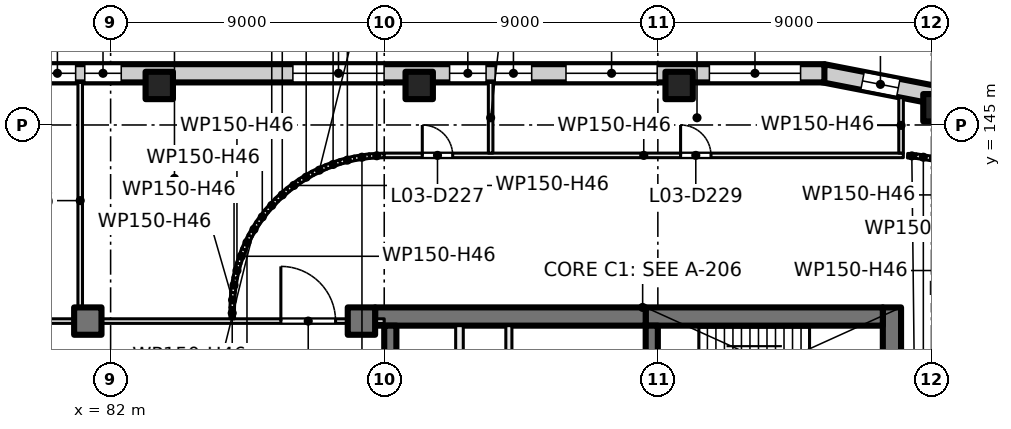
"""IFC4 building model, lengths in metres.
Left out: names, types, materials, properties, quantities, classifications, styles, units other than length and angle.
Written with IfcOpenShell. Run it as: python <this file> out.ifc"""

import sys

from ifc_helpers import new_model, si_unit, direction, frame, frame_2d, origin, origin_2d, place, context, subcontext, project, spatial, rectangle, extrude, element, fill, save


model = new_model("IFC4")
c1 = context("Model", 3, precision=1e-05, world=origin(), true_north=direction((0.0, 1.0)))
c2 = subcontext(c1, "Body", "Model", "MODEL_VIEW")
j1 = project(units=[si_unit("LENGTHUNIT", "METRE"), si_unit("PLANEANGLEUNIT", "RADIAN")], contexts=[c1])
p1 = place(None, origin())
s1 = spatial("IfcSite", under=j1, at=p1, CompositionType="ELEMENT")
p2 = place(p1, origin())
s2 = spatial("IfcBuilding", under=s1, at=p2, CompositionType="ELEMENT")
p3 = place(p2, frame((0.0, 0.0, 17.5)))
s3 = spatial("IfcBuildingStorey", under=s2, at=p3, CompositionType="ELEMENT", Elevation=17.5)
for number, where, z_axis, x_axis in (
    (1, (83.6, 146.3, 0.0), (0.0, 0.0, 1.0), (1.0, 0.0, 0.0)),
    (2, (92.15, 146.3, 0.0), (0.0, 0.0, 1.0), (1.0, 0.0, 0.0)),
    (3, (100.7, 146.3, 0.0), (0.0, 0.0, 1.0), (1.0, 0.0, 0.0)),
    (4, (109.18, 145.567, 0.0), (0.0, 0.0, 1.0), (1.0, 0.0, 0.0)),
    (5, (81.25, 138.55, 0.0), (0.0, 0.0, 1.0), (1.0, 0.0, 0.0)),
    (6, (90.25, 138.55, 0.0), (0.0, 0.0, 1.0), (1.0, 0.0, 0.0)),
):
    element("IfcColumn", number, at=place(p3, frame(where, z_axis=z_axis, x_axis=x_axis)), inside=s3, PredefinedType="COLUMN", context=c2, shape_type="SweptSolid", body=[
        extrude(rectangle(XDim=0.9, YDim=0.9, at=origin_2d()), origin(), (0.0, 0.0, 1.0), 5.0),
    ])
p4 = place(p3, frame((107.7, 139.0, 0.0), z_axis=(0.0, 0.0, 1.0), x_axis=(0.0, -1.0, 0.0)))
e7 = element("IfcWall", 7, at=p4, inside=s3, PredefinedType="SHEAR", context=c2, shape_type="SweptSolid", body=[
    extrude(rectangle(XDim=3.8, YDim=0.6, at=frame_2d((1.9, 0.0))), origin(), (0.0, 0.0, 1.0), 5.0),
])
p5 = place(p3, frame((107.4, 138.7, 0.0), z_axis=(0.0, 0.0, 1.0), x_axis=(-1.0, 0.0, 0.0)))
e8 = element("IfcWall", 8, at=p5, inside=s3, PredefinedType="SHEAR", context=c2, shape_type="SweptSolid", body=[
    extrude(rectangle(XDim=7.8, YDim=0.6, at=frame_2d((3.9, 0.0))), origin(), (0.0, 0.0, 1.0), 5.0),
])
p6 = place(p3, frame((99.6, 138.7, 0.0), z_axis=(0.0, 0.0, 1.0), x_axis=(-1.0, 0.0, 0.0)))
e9 = element("IfcWall", 9, at=p6, inside=s3, PredefinedType="SHEAR", context=c2, shape_type="SweptSolid", body=[
    extrude(rectangle(XDim=8.9, YDim=0.6, at=frame_2d((4.45, 0.0))), origin(), (0.0, 0.0, 1.0), 5.0),
])
p7 = place(p3, frame((99.8, 138.4, 0.0), z_axis=(0.0, 0.0, 1.0), x_axis=(0.0, -1.0, 0.0)))
e10 = element("IfcWall", 10, at=p7, inside=s3, PredefinedType="SHEAR", context=c2, shape_type="SweptSolid", body=[
    extrude(rectangle(XDim=2.8, YDim=0.4, at=frame_2d((1.4, 0.0))), origin(), (0.0, 0.0, 1.0), 5.0),
])
p8 = place(p7, frame((0.9, 0.0, 0.0)))
e11 = element("IfcOpeningElement", 11, at=p8, cuts=e10, PredefinedType="OPENING", context=c2, shape_type="SweptSolid", body=[
    extrude(rectangle(XDim=1.0, YDim=2.1, at=frame_2d((0.5, 1.05))), frame((0.0, 0.21, 0.0), z_axis=(0.0, -1.0, 0.0), x_axis=(1.0, 0.0, 0.0)), (0.0, 0.0, 1.0), 0.42),
])
p9 = place(p3, frame((91.2, 138.4, 0.0), z_axis=(0.0, 0.0, 1.0), x_axis=(0.0, -1.0, 0.0)))
e12 = element("IfcWall", 12, at=p9, inside=s3, PredefinedType="SHEAR", context=c2, shape_type="SweptSolid", body=[
    extrude(rectangle(XDim=8.6, YDim=0.4, at=frame_2d((4.3, 0.0))), origin(), (0.0, 0.0, 1.0), 5.0),
])
p10 = place(p3, frame((105.44, 146.702, 0.0), z_axis=(0.0, 0.0, 1.0), x_axis=(0.981593603981, -0.190981665674, 0.0)))
e13 = element("IfcWall", 13, at=p10, inside=s3, PredefinedType="SOLIDWALL", context=c2, shape_type="SweptSolid", body=[
    extrude(rectangle(XDim=4.025, YDim=0.6, at=frame_2d((2.013, 0.0))), origin(), (0.0, 0.0, 1.0), 4.6),
])
p11 = place(p10, frame((1.316, 0.0, 0.9)))
e14 = element("IfcOpeningElement", 14, at=p11, cuts=e13, PredefinedType="OPENING", context=c2, shape_type="SweptSolid", body=[
    extrude(rectangle(XDim=1.2, YDim=3.0, at=frame_2d((0.6, 1.5))), frame((0.0, 0.31, 0.0), z_axis=(0.0, -1.0, 0.0), x_axis=(1.0, 0.0, 0.0)), (0.0, 0.0, 1.0), 0.62),
])
p12 = place(p3, frame((46.114, 146.7, 0.0), z_axis=(0.0, 0.0, 1.0), x_axis=(1.0, 0.0, 0.0)))
e15 = element("IfcWall", 15, at=p12, inside=s3, PredefinedType="SOLIDWALL", context=c2, shape_type="SweptSolid", body=[
    extrude(rectangle(XDim=59.364, YDim=0.6, at=frame_2d((29.682, 0.0))), origin(), (0.0, 0.0, 1.0), 4.6),
])
p13 = place(p12, frame((5.35, 0.0, 0.9)))
e16 = element("IfcOpeningElement", 16, at=p13, cuts=e15, PredefinedType="OPENING", context=c2, shape_type="SweptSolid", body=[
    extrude(rectangle(XDim=3.0, YDim=3.0, at=frame_2d((1.5, 1.5))), frame((0.0, 0.31, 0.0), z_axis=(0.0, -1.0, 0.0), x_axis=(1.0, 0.0, 0.0)), (0.0, 0.0, 1.0), 0.62),
])
p14 = place(p12, frame((14.483, 0.0, 0.9)))
e17 = element("IfcOpeningElement", 17, at=p14, cuts=e15, PredefinedType="OPENING", context=c2, shape_type="SweptSolid", body=[
    extrude(rectangle(XDim=3.0, YDim=3.0, at=frame_2d((1.5, 1.5))), frame((0.0, 0.31, 0.0), z_axis=(0.0, -1.0, 0.0), x_axis=(1.0, 0.0, 0.0)), (0.0, 0.0, 1.0), 0.62),
])
p15 = place(p12, frame((23.615, 0.0, 0.9)))
e18 = element("IfcOpeningElement", 18, at=p15, cuts=e15, PredefinedType="OPENING", context=c2, shape_type="SweptSolid", body=[
    extrude(rectangle(XDim=3.0, YDim=3.0, at=frame_2d((1.5, 1.5))), frame((0.0, 0.31, 0.0), z_axis=(0.0, -1.0, 0.0), x_axis=(1.0, 0.0, 0.0)), (0.0, 0.0, 1.0), 0.62),
])
p16 = place(p12, frame((33.536, 0.0, 0.9)))
e19 = element("IfcOpeningElement", 19, at=p16, cuts=e15, PredefinedType="OPENING", context=c2, shape_type="SweptSolid", body=[
    extrude(rectangle(XDim=1.2, YDim=3.0, at=frame_2d((0.6, 1.5))), frame((0.0, 0.31, 0.0), z_axis=(0.0, -1.0, 0.0), x_axis=(1.0, 0.0, 0.0)), (0.0, 0.0, 1.0), 0.62),
])
p17 = place(p12, frame((35.036, 0.0, 0.9)))
e20 = element("IfcOpeningElement", 20, at=p17, cuts=e15, PredefinedType="OPENING", context=c2, shape_type="SweptSolid", body=[
    extrude(rectangle(XDim=1.2, YDim=3.0, at=frame_2d((0.6, 1.5))), frame((0.0, 0.31, 0.0), z_axis=(0.0, -1.0, 0.0), x_axis=(1.0, 0.0, 0.0)), (0.0, 0.0, 1.0), 0.62),
])
p18 = place(p12, frame((41.882, 0.0, 0.9)))
e21 = element("IfcOpeningElement", 21, at=p18, cuts=e15, PredefinedType="OPENING", context=c2, shape_type="SweptSolid", body=[
    extrude(rectangle(XDim=3.0, YDim=3.0, at=frame_2d((1.5, 1.5))), frame((0.0, 0.31, 0.0), z_axis=(0.0, -1.0, 0.0), x_axis=(1.0, 0.0, 0.0)), (0.0, 0.0, 1.0), 0.62),
])
p19 = place(p12, frame((47.036, 0.0, 0.9)))
e22 = element("IfcOpeningElement", 22, at=p19, cuts=e15, PredefinedType="OPENING", context=c2, shape_type="SweptSolid", body=[
    extrude(rectangle(XDim=1.2, YDim=3.0, at=frame_2d((0.6, 1.5))), frame((0.0, 0.31, 0.0), z_axis=(0.0, -1.0, 0.0), x_axis=(1.0, 0.0, 0.0)), (0.0, 0.0, 1.0), 0.62),
])
p20 = place(p12, frame((48.536, 0.0, 0.9)))
e23 = element("IfcOpeningElement", 23, at=p20, cuts=e15, PredefinedType="OPENING", context=c2, shape_type="SweptSolid", body=[
    extrude(rectangle(XDim=1.2, YDim=3.0, at=frame_2d((0.6, 1.5))), frame((0.0, 0.31, 0.0), z_axis=(0.0, -1.0, 0.0), x_axis=(1.0, 0.0, 0.0)), (0.0, 0.0, 1.0), 0.62),
])
p21 = place(p12, frame((50.865, 0.0, 0.9)))
e24 = element("IfcOpeningElement", 24, at=p21, cuts=e15, PredefinedType="OPENING", context=c2, shape_type="SweptSolid", body=[
    extrude(rectangle(XDim=3.0, YDim=3.0, at=frame_2d((1.5, 1.5))), frame((0.0, 0.31, 0.0), z_axis=(0.0, -1.0, 0.0), x_axis=(1.0, 0.0, 0.0)), (0.0, 0.0, 1.0), 0.62),
])
p22 = place(p12, frame((55.581, 0.0, 0.9)))
e25 = element("IfcOpeningElement", 25, at=p22, cuts=e15, PredefinedType="OPENING", context=c2, shape_type="SweptSolid", body=[
    extrude(rectangle(XDim=3.0, YDim=3.0, at=frame_2d((1.5, 1.5))), frame((0.0, 0.31, 0.0), z_axis=(0.0, -1.0, 0.0), x_axis=(1.0, 0.0, 0.0)), (0.0, 0.0, 1.0), 0.62),
])
p23 = place(p3, frame((95.1, 130.0, 0.0), z_axis=(0.0, 0.0, 1.0), x_axis=(0.0, 1.0, 0.0)))
e26 = element("IfcWall", 26, at=p23, inside=s3, PredefinedType="PARTITIONING", context=c2, shape_type="SweptSolid", body=[
    extrude(rectangle(XDim=8.4, YDim=0.2, at=frame_2d((4.2, 0.0))), origin(), (0.0, 0.0, 1.0), 4.6),
])
p24 = place(p23, frame((5.25, 0.0, 0.0)))
e27 = element("IfcOpeningElement", 27, at=p24, cuts=e26, PredefinedType="OPENING", context=c2, shape_type="SweptSolid", body=[
    extrude(rectangle(XDim=1.5, YDim=2.1, at=frame_2d((0.75, 1.05))), frame((0.0, 0.11, 0.0), z_axis=(0.0, -1.0, 0.0), x_axis=(1.0, 0.0, 0.0)), (0.0, 0.0, 1.0), 0.22),
])
p25 = place(p3, frame((93.475, 130.0, 0.0), z_axis=(0.0, 0.0, 1.0), x_axis=(0.0, 1.0, 0.0)))
e28 = element("IfcWall", 28, at=p25, inside=s3, PredefinedType="PARTITIONING", context=c2, shape_type="SweptSolid", body=[
    extrude(rectangle(XDim=8.4, YDim=0.25, at=frame_2d((4.2, 0.0))), origin(), (0.0, 0.0, 1.0), 4.6),
])
p26 = place(p25, frame((3.8, 0.0, 0.0)))
e29 = element("IfcOpeningElement", 29, at=p26, cuts=e28, PredefinedType="OPENING", context=c2, shape_type="SweptSolid", body=[
    extrude(rectangle(XDim=0.8, YDim=2.1, at=frame_2d((0.4, 1.05))), frame((0.0, 0.135, 0.0), z_axis=(0.0, -1.0, 0.0), x_axis=(1.0, 0.0, 0.0)), (0.0, 0.0, 1.0), 0.27),
])
p27 = place(p3, frame((49.825, 138.55, 0.0), z_axis=(0.0, 0.0, 1.0), x_axis=(1.0, 0.0, 0.0)))
e30 = element("IfcWall", 30, at=p27, inside=s3, PredefinedType="PARTITIONING", context=c2, shape_type="SweptSolid", body=[
    extrude(rectangle(XDim=41.175, YDim=0.15, at=frame_2d((20.587, 0.0))), origin(), (0.0, 0.0, 1.0), 4.6),
])
p28 = place(p27, frame((37.775, 0.0, 0.0)))
e31 = element("IfcOpeningElement", 31, at=p28, cuts=e30, PredefinedType="OPENING", context=c2, shape_type="SweptSolid", body=[
    extrude(rectangle(XDim=1.8, YDim=2.1, at=frame_2d((0.9, 1.05))), frame((0.0, 0.085, 0.0), z_axis=(0.0, -1.0, 0.0), x_axis=(1.0, 0.0, 0.0)), (0.0, 0.0, 1.0), 0.17),
])
p29 = place(p3, frame((81.0, 138.625, 0.0), z_axis=(0.0, 0.0, 1.0), x_axis=(0.0, 1.0, 0.0)))
e32 = element("IfcWall", 32, at=p29, inside=s3, PredefinedType="PARTITIONING", context=c2, shape_type="SweptSolid", body=[
    extrude(rectangle(XDim=7.775, YDim=0.15, at=frame_2d((3.887, 0.0))), origin(), (0.0, 0.0, 1.0), 4.6),
])
p30 = place(p3, frame((86.0, 138.625, 0.0), z_axis=(0.0, 0.0, 1.0), x_axis=(0.0, 1.0, 0.0)))
e33 = element("IfcWall", 33, at=p30, inside=s3, PredefinedType="PARTITIONING", context=c2, shape_type="SweptSolid", body=[
    extrude(rectangle(XDim=0.377, YDim=0.15, at=frame_2d((0.188, 0.0))), origin(), (0.0, 0.0, 1.0), 4.6),
])
p31 = place(p3, frame((86.0, 138.998, 0.0), z_axis=(0.0, 0.0, 1.0), x_axis=(0.048196018647, 0.998837896651, 0.0)))
e34 = element("IfcWall", 34, at=p31, inside=s3, PredefinedType="PARTITIONING", context=c2, shape_type="SweptSolid", body=[
    extrude(rectangle(XDim=0.496, YDim=0.15, at=frame_2d((0.248, 0.0))), origin(), (0.0, 0.0, 1.0), 4.6),
])
p32 = place(p3, frame((86.023, 139.486, 0.0), z_axis=(0.0, 0.0, 1.0), x_axis=(0.148412307247, 0.988925572052, 0.0)))
e35 = element("IfcWall", 35, at=p32, inside=s3, PredefinedType="PARTITIONING", context=c2, shape_type="SweptSolid", body=[
    extrude(rectangle(XDim=0.499, YDim=0.15, at=frame_2d((0.249, 0.0))), origin(), (0.0, 0.0, 1.0), 4.6),
])
p33 = place(p3, frame((86.095, 139.971, 0.0), z_axis=(0.0, 0.0, 1.0), x_axis=(0.242650732785, 0.970113715952, 0.0)))
e36 = element("IfcWall", 36, at=p33, inside=s3, PredefinedType="PARTITIONING", context=c2, shape_type="SweptSolid", body=[
    extrude(rectangle(XDim=0.499, YDim=0.15, at=frame_2d((0.25, 0.0))), origin(), (0.0, 0.0, 1.0), 4.6),
])
for number, where, z_axis, x_axis in (
    (37, (86.214, 140.447, 0.0), (0.0, 0.0, 1.0), (0.337, 0.941, 0.0)),
    (38, (86.379, 140.91, 0.0), (0.0, 0.0, 1.0), (0.428, 0.904, 0.0)),
):
    element("IfcWall", number, at=place(p3, frame(where, z_axis=z_axis, x_axis=x_axis)), inside=s3, PredefinedType="PARTITIONING", context=c2, shape_type="SweptSolid", body=[
        extrude(rectangle(XDim=0.498, YDim=0.15, at=frame_2d((0.249, 0.0))), origin(), (0.0, 0.0, 1.0), 4.6),
    ])
p34 = place(p3, frame((86.588, 141.354, 0.0), z_axis=(0.0, 0.0, 1.0), x_axis=(0.515791778052, 0.85671397893, 0.0)))
e39 = element("IfcWall", 39, at=p34, inside=s3, PredefinedType="PARTITIONING", context=c2, shape_type="SweptSolid", body=[
    extrude(rectangle(XDim=0.499, YDim=0.15, at=frame_2d((0.249, 0.0))), origin(), (0.0, 0.0, 1.0), 4.6),
])
p35 = place(p3, frame((86.841, 141.775, 0.0), z_axis=(0.0, 0.0, 1.0), x_axis=(0.594570362092, 0.80404358372, 0.0)))
e40 = element("IfcWall", 40, at=p35, inside=s3, PredefinedType="PARTITIONING", context=c2, shape_type="SweptSolid", body=[
    extrude(rectangle(XDim=0.498, YDim=0.15, at=frame_2d((0.249, 0.0))), origin(), (0.0, 0.0, 1.0), 4.6),
])
for number, where, z_axis, x_axis in (
    (41, (87.133, 142.169, 0.0), (0.0, 0.0, 1.0), (0.67, 0.742, 0.0)),
    (42, (87.461, 142.533, 0.0), (0.0, 0.0, 1.0), (0.742, 0.67, 0.0)),
):
    element("IfcWall", number, at=place(p3, frame(where, z_axis=z_axis, x_axis=x_axis)), inside=s3, PredefinedType="PARTITIONING", context=c2, shape_type="SweptSolid", body=[
        extrude(rectangle(XDim=0.499, YDim=0.15, at=frame_2d((0.249, 0.0))), origin(), (0.0, 0.0, 1.0), 4.6),
    ])
p36 = place(p3, frame((87.825, 142.863, 0.0), z_axis=(0.0, 0.0, 1.0), x_axis=(0.80404358372, 0.594570362092, 0.0)))
e43 = element("IfcWall", 43, at=p36, inside=s3, PredefinedType="PARTITIONING", context=c2, shape_type="SweptSolid", body=[
    extrude(rectangle(XDim=0.498, YDim=0.15, at=frame_2d((0.249, 0.0))), origin(), (0.0, 0.0, 1.0), 4.6),
])
p37 = place(p3, frame((88.219, 143.155, 0.0), z_axis=(0.0, 0.0, 1.0), x_axis=(0.85671397893, 0.515791778052, 0.0)))
e44 = element("IfcWall", 44, at=p37, inside=s3, PredefinedType="PARTITIONING", context=c2, shape_type="SweptSolid", body=[
    extrude(rectangle(XDim=0.499, YDim=0.15, at=frame_2d((0.249, 0.0))), origin(), (0.0, 0.0, 1.0), 4.6),
])
for number, where, z_axis, x_axis in (
    (45, (88.64, 143.408, 0.0), (0.0, 0.0, 1.0), (0.904, 0.428, 0.0)),
    (46, (89.084, 143.618, 0.0), (0.0, 0.0, 1.0), (0.941, 0.337, 0.0)),
):
    element("IfcWall", number, at=place(p3, frame(where, z_axis=z_axis, x_axis=x_axis)), inside=s3, PredefinedType="PARTITIONING", context=c2, shape_type="SweptSolid", body=[
        extrude(rectangle(XDim=0.498, YDim=0.15, at=frame_2d((0.249, 0.0))), origin(), (0.0, 0.0, 1.0), 4.6),
    ])
p38 = place(p3, frame((89.545, 143.784, 0.0), z_axis=(0.0, 0.0, 1.0), x_axis=(0.970113715952, 0.242650732785, 0.0)))
e47 = element("IfcWall", 47, at=p38, inside=s3, PredefinedType="PARTITIONING", context=c2, shape_type="SweptSolid", body=[
    extrude(rectangle(XDim=0.499, YDim=0.15, at=frame_2d((0.25, 0.0))), origin(), (0.0, 0.0, 1.0), 4.6),
])
p39 = place(p3, frame((90.021, 143.903, 0.0), z_axis=(0.0, 0.0, 1.0), x_axis=(0.988925572052, 0.148412307247, 0.0)))
e48 = element("IfcWall", 48, at=p39, inside=s3, PredefinedType="PARTITIONING", context=c2, shape_type="SweptSolid", body=[
    extrude(rectangle(XDim=0.499, YDim=0.15, at=frame_2d((0.249, 0.0))), origin(), (0.0, 0.0, 1.0), 4.6),
])
p40 = place(p3, frame((90.506, 143.976, 0.0), z_axis=(0.0, 0.0, 1.0), x_axis=(0.998837896651, 0.048196018647, 0.0)))
e49 = element("IfcWall", 49, at=p40, inside=s3, PredefinedType="PARTITIONING", context=c2, shape_type="SweptSolid", body=[
    extrude(rectangle(XDim=0.496, YDim=0.15, at=frame_2d((0.248, 0.0))), origin(), (0.0, 0.0, 1.0), 4.6),
])
p41 = place(p3, frame((90.998, 144.0, 0.0), z_axis=(0.0, 0.0, 1.0), x_axis=(1.0, 0.0, 0.0)))
e50 = element("IfcWall", 50, at=p41, inside=s3, PredefinedType="PARTITIONING", context=c2, shape_type="SweptSolid", body=[
    extrude(rectangle(XDim=17.077, YDim=0.15, at=frame_2d((8.539, 0.0))), origin(), (0.0, 0.0, 1.0), 4.6),
])
p42 = place(p41, frame((1.254, 0.0, 0.0)))
e51 = element("IfcOpeningElement", 51, at=p42, cuts=e50, PredefinedType="OPENING", context=c2, shape_type="SweptSolid", body=[
    extrude(rectangle(XDim=1.0, YDim=2.1, at=frame_2d((0.5, 1.05))), frame((0.0, 0.085, 0.0), z_axis=(0.0, -1.0, 0.0), x_axis=(1.0, 0.0, 0.0)), (0.0, 0.0, 1.0), 0.17),
])
p43 = place(p41, frame((9.75, 0.0, 0.0)))
e52 = element("IfcOpeningElement", 52, at=p43, cuts=e50, PredefinedType="OPENING", context=c2, shape_type="SweptSolid", body=[
    extrude(rectangle(XDim=1.0, YDim=2.1, at=frame_2d((0.5, 1.05))), frame((0.0, 0.085, 0.0), z_axis=(0.0, -1.0, 0.0), x_axis=(1.0, 0.0, 0.0)), (0.0, 0.0, 1.0), 0.17),
])
p44 = place(p3, frame((94.5, 144.075, 0.0), z_axis=(0.0, 0.0, 1.0), x_axis=(0.0, 1.0, 0.0)))
e53 = element("IfcWall", 53, at=p44, inside=s3, PredefinedType="PARTITIONING", context=c2, shape_type="SweptSolid", body=[
    extrude(rectangle(XDim=2.325, YDim=0.15, at=frame_2d((1.163, 0.0))), origin(), (0.0, 0.0, 1.0), 4.6),
])
p45 = place(p3, frame((108.0, 144.075, 0.0), z_axis=(0.0, 0.0, 1.0), x_axis=(0.0, 1.0, 0.0)))
e54 = element("IfcWall", 54, at=p45, inside=s3, PredefinedType="PARTITIONING", context=c2, shape_type="SweptSolid", body=[
    extrude(rectangle(XDim=1.823, YDim=0.15, at=frame_2d((0.912, 0.0))), origin(), (0.0, 0.0, 1.0), 4.6),
])
p46 = place(p3, frame((108.214, 143.99, 0.0), z_axis=(0.0, 0.0, 1.0), x_axis=(0.99876534507, -0.049676810357, 0.0)))
e55 = element("IfcWall", 55, at=p46, inside=s3, PredefinedType="PARTITIONING", context=c2, shape_type="SweptSolid", body=[
    extrude(rectangle(XDim=0.28, YDim=0.15, at=frame_2d((0.14, 0.0))), origin(), (0.0, 0.0, 1.0), 4.6),
])
p47 = place(p3, frame((108.486, 143.977, 0.0), z_axis=(0.0, 0.0, 1.0), x_axis=(0.988925572052, -0.148412307247, 0.0)))
e56 = element("IfcWall", 56, at=p47, inside=s3, PredefinedType="PARTITIONING", context=c2, shape_type="SweptSolid", body=[
    extrude(rectangle(XDim=0.499, YDim=0.15, at=frame_2d((0.249, 0.0))), origin(), (0.0, 0.0, 1.0), 4.6),
])
p48 = place(p3, frame((108.971, 143.905, 0.0), z_axis=(0.0, 0.0, 1.0), x_axis=(0.970113715952, -0.242650732785, 0.0)))
e57 = element("IfcWall", 57, at=p48, inside=s3, PredefinedType="PARTITIONING", context=c2, shape_type="SweptSolid", body=[
    extrude(rectangle(XDim=0.499, YDim=0.15, at=frame_2d((0.25, 0.0))), origin(), (0.0, 0.0, 1.0), 4.6),
])
p49 = place(p11, origin())
e58 = element("IfcWindow", 58, at=p49, inside=s3, PartitioningType="SINGLE_PANEL", PredefinedType="WINDOW", context=c2, shape_type="SweptSolid", body=[
    extrude(rectangle(XDim=1.2, YDim=3.0, at=frame_2d((0.6, 1.5))), frame((0.0, 0.03, 0.0), z_axis=(0.0, -1.0, 0.0), x_axis=(1.0, 0.0, 0.0)), (0.0, 0.0, 1.0), 0.06),
])
fill(e14, e58)
p50 = place(p16, origin())
e59 = element("IfcWindow", 59, at=p50, inside=s3, PartitioningType="SINGLE_PANEL", PredefinedType="WINDOW", context=c2, shape_type="SweptSolid", body=[
    extrude(rectangle(XDim=1.2, YDim=3.0, at=frame_2d((0.6, 1.5))), frame((0.0, 0.03, 0.0), z_axis=(0.0, -1.0, 0.0), x_axis=(1.0, 0.0, 0.0)), (0.0, 0.0, 1.0), 0.06),
])
fill(e19, e59)
p51 = place(p17, origin())
e60 = element("IfcWindow", 60, at=p51, inside=s3, PartitioningType="SINGLE_PANEL", PredefinedType="WINDOW", context=c2, shape_type="SweptSolid", body=[
    extrude(rectangle(XDim=1.2, YDim=3.0, at=frame_2d((0.6, 1.5))), frame((0.0, 0.03, 0.0), z_axis=(0.0, -1.0, 0.0), x_axis=(1.0, 0.0, 0.0)), (0.0, 0.0, 1.0), 0.06),
])
fill(e20, e60)
p52 = place(p18, origin())
e61 = element("IfcWindow", 61, at=p52, inside=s3, PartitioningType="SINGLE_PANEL", PredefinedType="WINDOW", context=c2, shape_type="SweptSolid", body=[
    extrude(rectangle(XDim=3.0, YDim=3.0, at=frame_2d((1.5, 1.5))), frame((0.0, 0.03, 0.0), z_axis=(0.0, -1.0, 0.0), x_axis=(1.0, 0.0, 0.0)), (0.0, 0.0, 1.0), 0.06),
])
fill(e21, e61)
p53 = place(p19, origin())
e62 = element("IfcWindow", 62, at=p53, inside=s3, PartitioningType="SINGLE_PANEL", PredefinedType="WINDOW", context=c2, shape_type="SweptSolid", body=[
    extrude(rectangle(XDim=1.2, YDim=3.0, at=frame_2d((0.6, 1.5))), frame((0.0, 0.03, 0.0), z_axis=(0.0, -1.0, 0.0), x_axis=(1.0, 0.0, 0.0)), (0.0, 0.0, 1.0), 0.06),
])
fill(e22, e62)
p54 = place(p20, origin())
e63 = element("IfcWindow", 63, at=p54, inside=s3, PartitioningType="SINGLE_PANEL", PredefinedType="WINDOW", context=c2, shape_type="SweptSolid", body=[
    extrude(rectangle(XDim=1.2, YDim=3.0, at=frame_2d((0.6, 1.5))), frame((0.0, 0.03, 0.0), z_axis=(0.0, -1.0, 0.0), x_axis=(1.0, 0.0, 0.0)), (0.0, 0.0, 1.0), 0.06),
])
fill(e23, e63)
p55 = place(p21, origin())
e64 = element("IfcWindow", 64, at=p55, inside=s3, PartitioningType="SINGLE_PANEL", PredefinedType="WINDOW", context=c2, shape_type="SweptSolid", body=[
    extrude(rectangle(XDim=3.0, YDim=3.0, at=frame_2d((1.5, 1.5))), frame((0.0, 0.03, 0.0), z_axis=(0.0, -1.0, 0.0), x_axis=(1.0, 0.0, 0.0)), (0.0, 0.0, 1.0), 0.06),
])
fill(e24, e64)
p56 = place(p22, origin())
e65 = element("IfcWindow", 65, at=p56, inside=s3, PartitioningType="SINGLE_PANEL", PredefinedType="WINDOW", context=c2, shape_type="SweptSolid", body=[
    extrude(rectangle(XDim=3.0, YDim=3.0, at=frame_2d((1.5, 1.5))), frame((0.0, 0.03, 0.0), z_axis=(0.0, -1.0, 0.0), x_axis=(1.0, 0.0, 0.0)), (0.0, 0.0, 1.0), 0.06),
])
fill(e25, e65)
p57 = place(p28, origin())
e66 = element("IfcDoor", 66, at=p57, inside=s3, OperationType="DOUBLE_DOOR_SINGLE_SWING", PredefinedType="DOOR", context=c2, shape_type="SweptSolid", body=[
    extrude(rectangle(XDim=1.8, YDim=2.1, at=frame_2d((0.9, 1.05))), frame((0.0, 0.025, 0.0), z_axis=(0.0, -1.0, 0.0), x_axis=(1.0, 0.0, 0.0)), (0.0, 0.0, 1.0), 0.05),
])
fill(e31, e66)
p58 = place(p42, origin())
e67 = element("IfcDoor", 67, at=p58, inside=s3, OperationType="SINGLE_SWING_LEFT", PredefinedType="DOOR", context=c2, shape_type="SweptSolid", body=[
    extrude(rectangle(XDim=1.0, YDim=2.1, at=frame_2d((0.5, 1.05))), frame((0.0, 0.025, 0.0), z_axis=(0.0, -1.0, 0.0), x_axis=(1.0, 0.0, 0.0)), (0.0, 0.0, 1.0), 0.05),
])
fill(e51, e67)
p59 = place(p43, origin())
e68 = element("IfcDoor", 68, at=p59, inside=s3, OperationType="SINGLE_SWING_LEFT", PredefinedType="DOOR", context=c2, shape_type="SweptSolid", body=[
    extrude(rectangle(XDim=1.0, YDim=2.1, at=frame_2d((0.5, 1.05))), frame((0.0, 0.025, 0.0), z_axis=(0.0, -1.0, 0.0), x_axis=(1.0, 0.0, 0.0)), (0.0, 0.0, 1.0), 0.05),
])
fill(e52, e68)
save(model, sys.argv[1])
